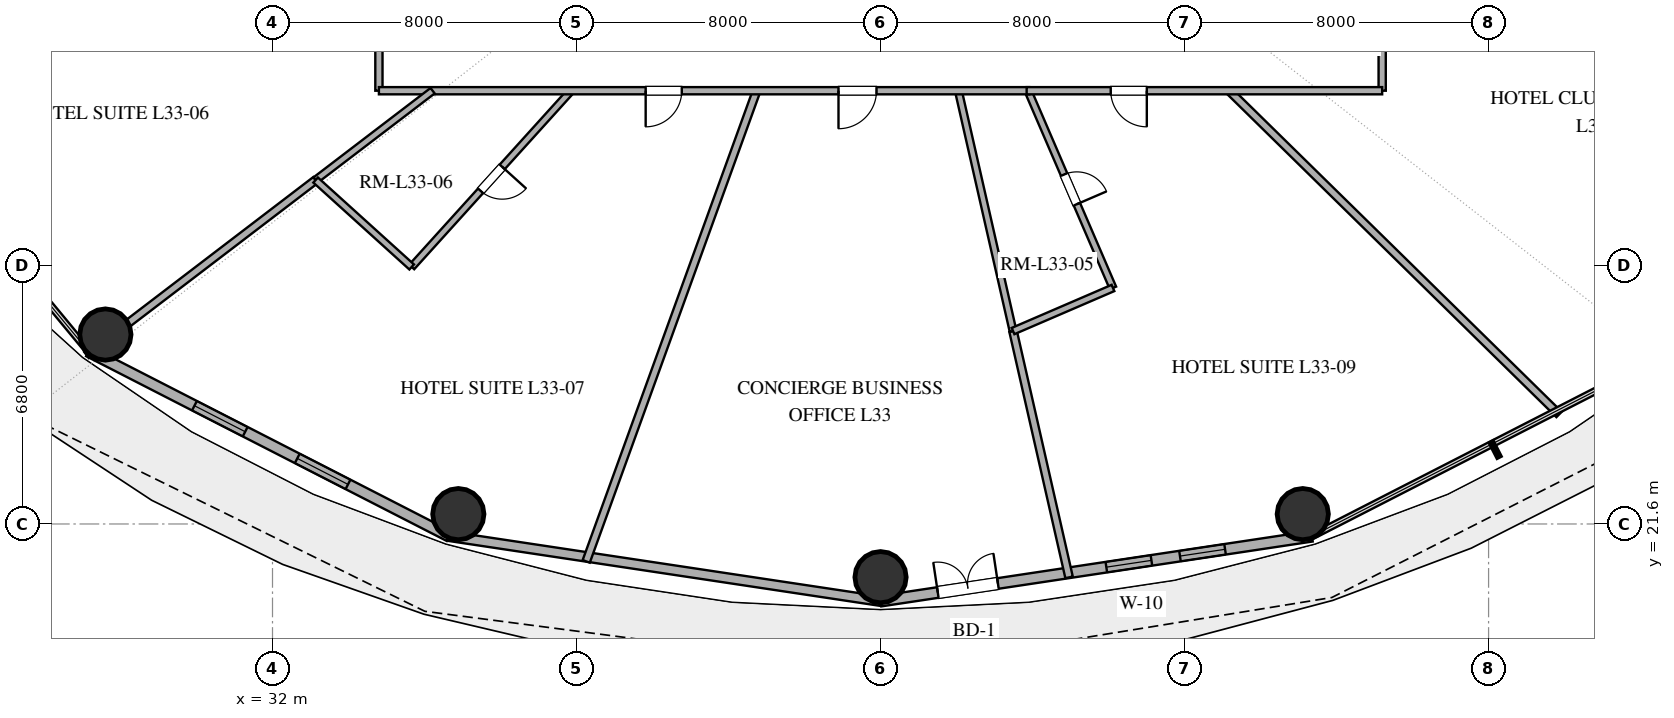
"""IFC4 building model, lengths in metres.
Left out: names, types, materials, properties, quantities, classifications, styles, units other than length and angle.
Written with IfcOpenShell. Run it as: python <this file> out.ifc"""

import sys

from ifc_helpers import new_model, si_unit, direction, frame, frame_2d, origin, origin_2d, place, context, subcontext, project, spatial, rectangle, hollow_circle, extrude, element, fill, save


model = new_model("IFC4")
c1 = context("Model", 3, precision=1e-05, world=origin(), true_north=direction((0.0, 1.0)))
c2 = subcontext(c1, "Body", "Model", "MODEL_VIEW")
j1 = project(units=[si_unit("LENGTHUNIT", "METRE"), si_unit("PLANEANGLEUNIT", "RADIAN")], contexts=[c1])
p1 = place(None, origin())
s1 = spatial("IfcSite", under=j1, at=p1, CompositionType="ELEMENT")
p2 = place(p1, origin())
s2 = spatial("IfcBuilding", under=s1, at=p2, CompositionType="ELEMENT")
p3 = place(p2, frame((0.0, 0.0, 130.8)))
s3 = spatial("IfcBuildingStorey", under=s2, at=p3, CompositionType="ELEMENT", Elevation=130.8)
for number, where, z_axis, x_axis in (
    (1, (27.602, 26.585, 0.0), (0.0, 0.0, 1.0), (1.0, 0.0, 0.0)),
    (2, (36.89, 21.859, 0.0), (0.0, 0.0, 1.0), (1.0, 0.0, 0.0)),
    (3, (48.0, 20.2, 0.0), (0.0, 0.0, 1.0), (1.0, 0.0, 0.0)),
    (4, (59.11, 21.859, 0.0), (0.0, 0.0, 1.0), (1.0, 0.0, 0.0)),
):
    element("IfcColumn", number, at=place(p3, frame(where, z_axis=z_axis, x_axis=x_axis)), inside=s3, PredefinedType="COLUMN", context=c2, shape_type="SweptSolid", body=[
        extrude(hollow_circle(Radius=0.675, WallThickness=0.036, at=origin_2d()), origin(), (0.0, 0.0, 1.0), 3.32),
    ])
p4 = place(p3, frame((27.16, 26.14, 0.0), z_axis=(0.0, 0.0, 1.0), x_axis=(0.889959505023, -0.45603955905, 0.0)))
e5 = element("IfcWall", 5, at=p4, inside=s3, PredefinedType="SOLIDWALL", context=c2, shape_type="SweptSolid", body=[
    extrude(rectangle(XDim=10.662, YDim=0.28, at=frame_2d((5.331, 0.0))), origin(), (0.0, 0.0, 1.0), 3.32),
])
p5 = place(p4, frame((3.131, 0.0, 0.85)))
e6 = element("IfcOpeningElement", 6, at=p5, cuts=e5, PredefinedType="OPENING", context=c2, shape_type="SweptSolid", body=[
    extrude(rectangle(XDim=1.5, YDim=1.8, at=frame_2d((0.75, 0.9))), frame((0.0, 0.15, 0.0), z_axis=(0.0, -1.0, 0.0), x_axis=(1.0, 0.0, 0.0)), (0.0, 0.0, 1.0), 0.3),
])
p6 = place(p4, frame((6.171, 0.0, 0.85)))
e7 = element("IfcOpeningElement", 7, at=p6, cuts=e5, PredefinedType="OPENING", context=c2, shape_type="SweptSolid", body=[
    extrude(rectangle(XDim=1.5, YDim=1.8, at=frame_2d((0.75, 0.9))), frame((0.0, 0.15, 0.0), z_axis=(0.0, -1.0, 0.0), x_axis=(1.0, 0.0, 0.0)), (0.0, 0.0, 1.0), 0.3),
])
p7 = place(p3, frame((36.649, 21.277, 0.0), z_axis=(0.0, 0.0, 1.0), x_axis=(0.988877774656, -0.148730450117, 0.0)))
e8 = element("IfcWall", 8, at=p7, inside=s3, PredefinedType="SOLIDWALL", context=c2, shape_type="SweptSolid", body=[
    extrude(rectangle(XDim=11.479, YDim=0.25, at=frame_2d((5.74, 0.0))), origin(), (0.0, 0.0, 1.0), 3.32),
])
p8 = place(p3, frame((48.0, 19.57, 0.0), z_axis=(0.0, 0.0, 1.0), x_axis=(0.988877774656, 0.148730450117, 0.0)))
e9 = element("IfcWall", 9, at=p8, inside=s3, PredefinedType="SOLIDWALL", context=c2, shape_type="SweptSolid", body=[
    extrude(rectangle(XDim=11.479, YDim=0.28, at=frame_2d((5.74, 0.0))), origin(), (0.0, 0.0, 1.0), 3.32),
])
p9 = place(p8, frame((1.524, 0.0, 0.0)))
e10 = element("IfcOpeningElement", 10, at=p9, cuts=e9, PredefinedType="OPENING", context=c2, shape_type="SweptSolid", body=[
    extrude(rectangle(XDim=1.6, YDim=2.25, at=frame_2d((0.8, 1.125))), frame((0.0, 0.15, 0.0), z_axis=(0.0, -1.0, 0.0), x_axis=(1.0, 0.0, 0.0)), (0.0, 0.0, 1.0), 0.3),
])
p10 = place(p8, frame((6.008, 0.0, 0.85)))
e11 = element("IfcOpeningElement", 11, at=p10, cuts=e9, PredefinedType="OPENING", context=c2, shape_type="SweptSolid", body=[
    extrude(rectangle(XDim=1.2, YDim=1.6, at=frame_2d((0.6, 0.8))), frame((0.0, 0.15, 0.0), z_axis=(0.0, -1.0, 0.0), x_axis=(1.0, 0.0, 0.0)), (0.0, 0.0, 1.0), 0.3),
])
p11 = place(p8, frame((7.968, 0.0, 0.85)))
e12 = element("IfcOpeningElement", 12, at=p11, cuts=e9, PredefinedType="OPENING", context=c2, shape_type="SweptSolid", body=[
    extrude(rectangle(XDim=1.2, YDim=1.6, at=frame_2d((0.6, 0.8))), frame((0.0, 0.15, 0.0), z_axis=(0.0, -1.0, 0.0), x_axis=(1.0, 0.0, 0.0)), (0.0, 0.0, 1.0), 0.3),
])
p12 = place(p3, frame((44.74, 33.0, 0.0), z_axis=(0.0, 0.0, 1.0), x_axis=(-0.340540254487, -0.940229937342, 0.0)))
e13 = element("IfcWall", 13, at=p12, inside=s3, PredefinedType="PARTITIONING", context=c2, shape_type="SweptSolid", body=[
    extrude(rectangle(XDim=13.171, YDim=0.2, at=frame_2d((6.586, 0.0))), origin(), (0.0, 0.0, 1.0), 2.68),
])
p13 = place(p3, frame((57.173, 33.0, 0.0), z_axis=(0.0, 0.0, 1.0), x_axis=(0.713799293149, -0.700350318841, 0.0)))
e14 = element("IfcWall", 14, at=p13, inside=s3, PredefinedType="PARTITIONING", context=c2, shape_type="SweptSolid", body=[
    extrude(rectangle(XDim=12.163, YDim=0.2, at=frame_2d((6.081, 0.0))), origin(), (0.0, 0.0, 1.0), 2.68),
])
p14 = place(p3, frame((27.105, 26.046, 0.0), z_axis=(0.0, 0.0, 1.0), x_axis=(0.794798861724, 0.606872943376, 0.0)))
e15 = element("IfcWall", 15, at=p14, inside=s3, PredefinedType="PARTITIONING", context=c2, shape_type="SweptSolid", body=[
    extrude(rectangle(XDim=7.586, YDim=0.2, at=frame_2d((3.793, 0.0))), origin(), (0.0, 0.0, 1.0), 2.68),
])
p15 = place(p3, frame((52.961, 20.195, 0.0), z_axis=(0.0, 0.0, 1.0), x_axis=(-0.221859239387, 0.975078703438, 0.0)))
e16 = element("IfcWall", 16, at=p15, inside=s3, PredefinedType="PARTITIONING", context=c2, shape_type="SweptSolid", body=[
    extrude(rectangle(XDim=6.646, YDim=0.2, at=frame_2d((3.323, 0.0))), origin(), (0.0, 0.0, 1.0), 2.68),
])
p16 = place(p3, frame((51.487, 26.676, 0.0), z_axis=(0.0, 0.0, 1.0), x_axis=(-0.221842382837, 0.975082538648, 0.0)))
e17 = element("IfcWall", 17, at=p16, inside=s3, PredefinedType="PLUMBINGWALL", context=c2, shape_type="SweptSolid", body=[
    extrude(rectangle(XDim=6.485, YDim=0.18, at=frame_2d((3.243, 0.0))), origin(), (0.0, 0.0, 1.0), 2.68),
])
p17 = place(p3, frame((61.2, 41.749, 0.0), z_axis=(0.0, 0.0, 1.0), x_axis=(0.0, -1.0, 0.0)))
e18 = element("IfcWall", 18, at=p17, inside=s3, PredefinedType="PARTITIONING", context=c2, shape_type="SweptSolid", body=[
    extrude(rectangle(XDim=8.749, YDim=0.19, at=frame_2d((4.375, 0.0))), origin(), (0.0, 0.0, 1.0), 2.68),
])
p18 = place(p17, frame((5.103, 0.0, 0.0)))
e19 = element("IfcOpeningElement", 19, at=p18, cuts=e18, PredefinedType="OPENING", context=c2, shape_type="SweptSolid", body=[
    extrude(rectangle(XDim=1.0, YDim=2.2, at=frame_2d((0.5, 1.1))), frame((0.0, 0.105, 0.0), z_axis=(0.0, -1.0, 0.0), x_axis=(1.0, 0.0, 0.0)), (0.0, 0.0, 1.0), 0.21),
])
p19 = place(p3, frame((39.857, 33.0, 0.0), z_axis=(0.0, 0.0, 1.0), x_axis=(-0.670890833363, -0.741556127147, 0.0)))
e20 = element("IfcWall", 20, at=p19, inside=s3, PredefinedType="PLUMBINGWALL", context=c2, shape_type="SweptSolid", body=[
    extrude(rectangle(XDim=6.253, YDim=0.18, at=frame_2d((3.127, 0.0))), origin(), (0.0, 0.0, 1.0), 2.68),
])
p20 = place(p19, frame((2.702, 0.0, 0.0)))
e21 = element("IfcOpeningElement", 21, at=p20, cuts=e20, PredefinedType="OPENING", context=c2, shape_type="SweptSolid", body=[
    extrude(rectangle(XDim=0.85, YDim=2.1, at=frame_2d((0.425, 1.05))), frame((0.0, 0.1, 0.0), z_axis=(0.0, -1.0, 0.0), x_axis=(1.0, 0.0, 0.0)), (0.0, 0.0, 1.0), 0.2),
])
p21 = place(p3, frame((51.879, 33.0, 0.0), z_axis=(0.0, 0.0, 1.0), x_axis=(0.395831860018, -0.918323003412, 0.0)))
e22 = element("IfcWall", 22, at=p21, inside=s3, PredefinedType="PLUMBINGWALL", context=c2, shape_type="SweptSolid", body=[
    extrude(rectangle(XDim=5.652, YDim=0.18, at=frame_2d((2.826, 0.0))), origin(), (0.0, 0.0, 1.0), 2.68),
])
p22 = place(p21, frame((2.401, 0.0, 0.0)))
e23 = element("IfcOpeningElement", 23, at=p22, cuts=e22, PredefinedType="OPENING", context=c2, shape_type="SweptSolid", body=[
    extrude(rectangle(XDim=0.85, YDim=2.1, at=frame_2d((0.425, 1.05))), frame((0.0, 0.1, 0.0), z_axis=(0.0, -1.0, 0.0), x_axis=(1.0, 0.0, 0.0)), (0.0, 0.0, 1.0), 0.2),
])
p23 = place(p3, frame((34.8, 33.0, 0.0), z_axis=(0.0, 0.0, 1.0), x_axis=(0.0, 1.0, 0.0)))
e24 = element("IfcWall", 24, at=p23, inside=s3, PredefinedType="PARTITIONING", context=c2, shape_type="SweptSolid", body=[
    extrude(rectangle(XDim=5.463, YDim=0.19, at=frame_2d((2.731, 0.0))), origin(), (0.0, 0.0, 1.0), 2.68),
])
p24 = place(p23, frame((2.256, 0.0, 0.0)))
e25 = element("IfcOpeningElement", 25, at=p24, cuts=e24, PredefinedType="OPENING", context=c2, shape_type="SweptSolid", body=[
    extrude(rectangle(XDim=0.95, YDim=2.15, at=frame_2d((0.475, 1.075))), frame((0.0, 0.105, 0.0), z_axis=(0.0, -1.0, 0.0), x_axis=(1.0, 0.0, 0.0)), (0.0, 0.0, 1.0), 0.21),
])
p25 = place(p3, frame((51.914, 33.0, 0.0), z_axis=(0.0, 0.0, 1.0), x_axis=(-1.0, 0.0, 0.0)))
e26 = element("IfcWall", 26, at=p25, inside=s3, PredefinedType="PARTITIONING", context=c2, shape_type="SweptSolid", body=[
    extrude(rectangle(XDim=17.114, YDim=0.19, at=frame_2d((8.557, 0.0))), origin(), (0.0, 0.0, 1.0), 2.68),
])
p26 = place(p25, frame((4.021, 0.0, 0.0)))
e27 = element("IfcOpeningElement", 27, at=p26, cuts=e26, PredefinedType="OPENING", context=c2, shape_type="SweptSolid", body=[
    extrude(rectangle(XDim=1.0, YDim=2.2, at=frame_2d((0.5, 1.1))), frame((0.0, 0.105, 0.0), z_axis=(0.0, -1.0, 0.0), x_axis=(1.0, 0.0, 0.0)), (0.0, 0.0, 1.0), 0.21),
])
p27 = place(p25, frame((9.145, 0.0, 0.0)))
e28 = element("IfcOpeningElement", 28, at=p27, cuts=e26, PredefinedType="OPENING", context=c2, shape_type="SweptSolid", body=[
    extrude(rectangle(XDim=0.95, YDim=2.15, at=frame_2d((0.475, 1.075))), frame((0.0, 0.105, 0.0), z_axis=(0.0, -1.0, 0.0), x_axis=(1.0, 0.0, 0.0)), (0.0, 0.0, 1.0), 0.21),
])
p28 = place(p3, frame((61.2, 33.0, 0.0), z_axis=(0.0, 0.0, 1.0), x_axis=(-1.0, 0.0, 0.0)))
e29 = element("IfcWall", 29, at=p28, inside=s3, PredefinedType="PARTITIONING", context=c2, shape_type="SweptSolid", body=[
    extrude(rectangle(XDim=9.355, YDim=0.19, at=frame_2d((4.678, 0.0))), origin(), (0.0, 0.0, 1.0), 2.68),
])
p29 = place(p28, frame((6.193, 0.0, 0.0)))
e30 = element("IfcOpeningElement", 30, at=p29, cuts=e29, PredefinedType="OPENING", context=c2, shape_type="SweptSolid", body=[
    extrude(rectangle(XDim=0.95, YDim=2.15, at=frame_2d((0.475, 1.075))), frame((0.0, 0.105, 0.0), z_axis=(0.0, -1.0, 0.0), x_axis=(1.0, 0.0, 0.0)), (0.0, 0.0, 1.0), 0.21),
])
p30 = place(p3, frame((33.135, 30.649, 0.0), z_axis=(0.0, 0.0, 1.0), x_axis=(0.794788820215, 0.606886094141, 0.0)))
e31 = element("IfcWall", 31, at=p30, inside=s3, PredefinedType="PLUMBINGWALL", context=c2, shape_type="SweptSolid", body=[
    extrude(rectangle(XDim=3.873, YDim=0.18, at=frame_2d((1.937, 0.0))), origin(), (0.0, 0.0, 1.0), 2.68),
])
p31 = place(p3, frame((35.662, 28.363, 0.0), z_axis=(0.0, 0.0, 1.0), x_axis=(-0.741571413778, 0.670873936196, 0.0)))
e32 = element("IfcWall", 32, at=p31, inside=s3, PredefinedType="PLUMBINGWALL", context=c2, shape_type="SweptSolid", body=[
    extrude(rectangle(XDim=3.408, YDim=0.18, at=frame_2d((1.704, 0.0))), origin(), (0.0, 0.0, 1.0), 2.68),
])
p32 = place(p3, frame((54.116, 27.81, 0.0), z_axis=(0.0, 0.0, 1.0), x_axis=(-0.918296301957, -0.395893801178, 0.0)))
e33 = element("IfcWall", 33, at=p32, inside=s3, PredefinedType="PLUMBINGWALL", context=c2, shape_type="SweptSolid", body=[
    extrude(rectangle(XDim=2.864, YDim=0.18, at=frame_2d((1.432, 0.0))), origin(), (0.0, 0.0, 1.0), 2.68),
])
p33 = place(p5, origin())
e34 = element("IfcWindow", 34, at=p33, inside=s3, PartitioningType="SINGLE_PANEL", PredefinedType="WINDOW", context=c2, shape_type="SweptSolid", body=[
    extrude(rectangle(XDim=1.5, YDim=1.8, at=frame_2d((0.75, 0.9))), frame((0.0, 0.03, 0.0), z_axis=(0.0, -1.0, 0.0), x_axis=(1.0, 0.0, 0.0)), (0.0, 0.0, 1.0), 0.06),
])
fill(e6, e34)
p34 = place(p6, origin())
e35 = element("IfcWindow", 35, at=p34, inside=s3, PartitioningType="SINGLE_PANEL", PredefinedType="WINDOW", context=c2, shape_type="SweptSolid", body=[
    extrude(rectangle(XDim=1.5, YDim=1.8, at=frame_2d((0.75, 0.9))), frame((0.0, 0.03, 0.0), z_axis=(0.0, -1.0, 0.0), x_axis=(1.0, 0.0, 0.0)), (0.0, 0.0, 1.0), 0.06),
])
fill(e7, e35)
p35 = place(p9, origin())
e36 = element("IfcDoor", 36, at=p35, inside=s3, OperationType="DOUBLE_DOOR_SINGLE_SWING", PredefinedType="DOOR", context=c2, shape_type="SweptSolid", body=[
    extrude(rectangle(XDim=1.6, YDim=2.25, at=frame_2d((0.8, 1.125))), frame((0.0, 0.025, 0.0), z_axis=(0.0, -1.0, 0.0), x_axis=(1.0, 0.0, 0.0)), (0.0, 0.0, 1.0), 0.05),
])
fill(e10, e36)
p36 = place(p10, origin())
e37 = element("IfcWindow", 37, at=p36, inside=s3, PartitioningType="SINGLE_PANEL", PredefinedType="WINDOW", context=c2, shape_type="SweptSolid", body=[
    extrude(rectangle(XDim=1.2, YDim=1.6, at=frame_2d((0.6, 0.8))), frame((0.0, 0.03, 0.0), z_axis=(0.0, -1.0, 0.0), x_axis=(1.0, 0.0, 0.0)), (0.0, 0.0, 1.0), 0.06),
])
fill(e11, e37)
p37 = place(p11, origin())
e38 = element("IfcWindow", 38, at=p37, inside=s3, PartitioningType="SINGLE_PANEL", PredefinedType="WINDOW", context=c2, shape_type="SweptSolid", body=[
    extrude(rectangle(XDim=1.2, YDim=1.6, at=frame_2d((0.6, 0.8))), frame((0.0, 0.03, 0.0), z_axis=(0.0, -1.0, 0.0), x_axis=(1.0, 0.0, 0.0)), (0.0, 0.0, 1.0), 0.06),
])
fill(e12, e38)
p38 = place(p20, origin())
e39 = element("IfcDoor", 39, at=p38, inside=s3, OperationType="SINGLE_SWING_LEFT", PredefinedType="DOOR", context=c2, shape_type="SweptSolid", body=[
    extrude(rectangle(XDim=0.85, YDim=2.1, at=frame_2d((0.425, 1.05))), frame((0.0, 0.025, 0.0), z_axis=(0.0, -1.0, 0.0), x_axis=(1.0, 0.0, 0.0)), (0.0, 0.0, 1.0), 0.05),
])
fill(e21, e39)
p39 = place(p22, origin())
e40 = element("IfcDoor", 40, at=p39, inside=s3, OperationType="SINGLE_SWING_RIGHT", PredefinedType="DOOR", context=c2, shape_type="SweptSolid", body=[
    extrude(rectangle(XDim=0.85, YDim=2.1, at=frame_2d((0.425, 1.05))), frame((0.0, 0.025, 0.0), z_axis=(0.0, -1.0, 0.0), x_axis=(1.0, 0.0, 0.0)), (0.0, 0.0, 1.0), 0.05),
])
fill(e23, e40)
p40 = place(p26, origin())
e41 = element("IfcDoor", 41, at=p40, inside=s3, OperationType="SINGLE_SWING_RIGHT", PredefinedType="DOOR", context=c2, shape_type="SweptSolid", body=[
    extrude(rectangle(XDim=1.0, YDim=2.2, at=frame_2d((0.5, 1.1))), frame((0.0, 0.025, 0.0), z_axis=(0.0, -1.0, 0.0), x_axis=(1.0, 0.0, 0.0)), (0.0, 0.0, 1.0), 0.05),
])
fill(e27, e41)
p41 = place(p27, origin())
e42 = element("IfcDoor", 42, at=p41, inside=s3, OperationType="SINGLE_SWING_RIGHT", PredefinedType="DOOR", context=c2, shape_type="SweptSolid", body=[
    extrude(rectangle(XDim=0.95, YDim=2.15, at=frame_2d((0.475, 1.075))), frame((0.0, 0.025, 0.0), z_axis=(0.0, -1.0, 0.0), x_axis=(1.0, 0.0, 0.0)), (0.0, 0.0, 1.0), 0.05),
])
fill(e28, e42)
p42 = place(p29, origin())
e43 = element("IfcDoor", 43, at=p42, inside=s3, OperationType="SINGLE_SWING_LEFT", PredefinedType="DOOR", context=c2, shape_type="SweptSolid", body=[
    extrude(rectangle(XDim=0.95, YDim=2.15, at=frame_2d((0.475, 1.075))), frame((0.0, 0.025, 0.0), z_axis=(0.0, -1.0, 0.0), x_axis=(1.0, 0.0, 0.0)), (0.0, 0.0, 1.0), 0.05),
])
fill(e30, e43)
save(model, sys.argv[1])
